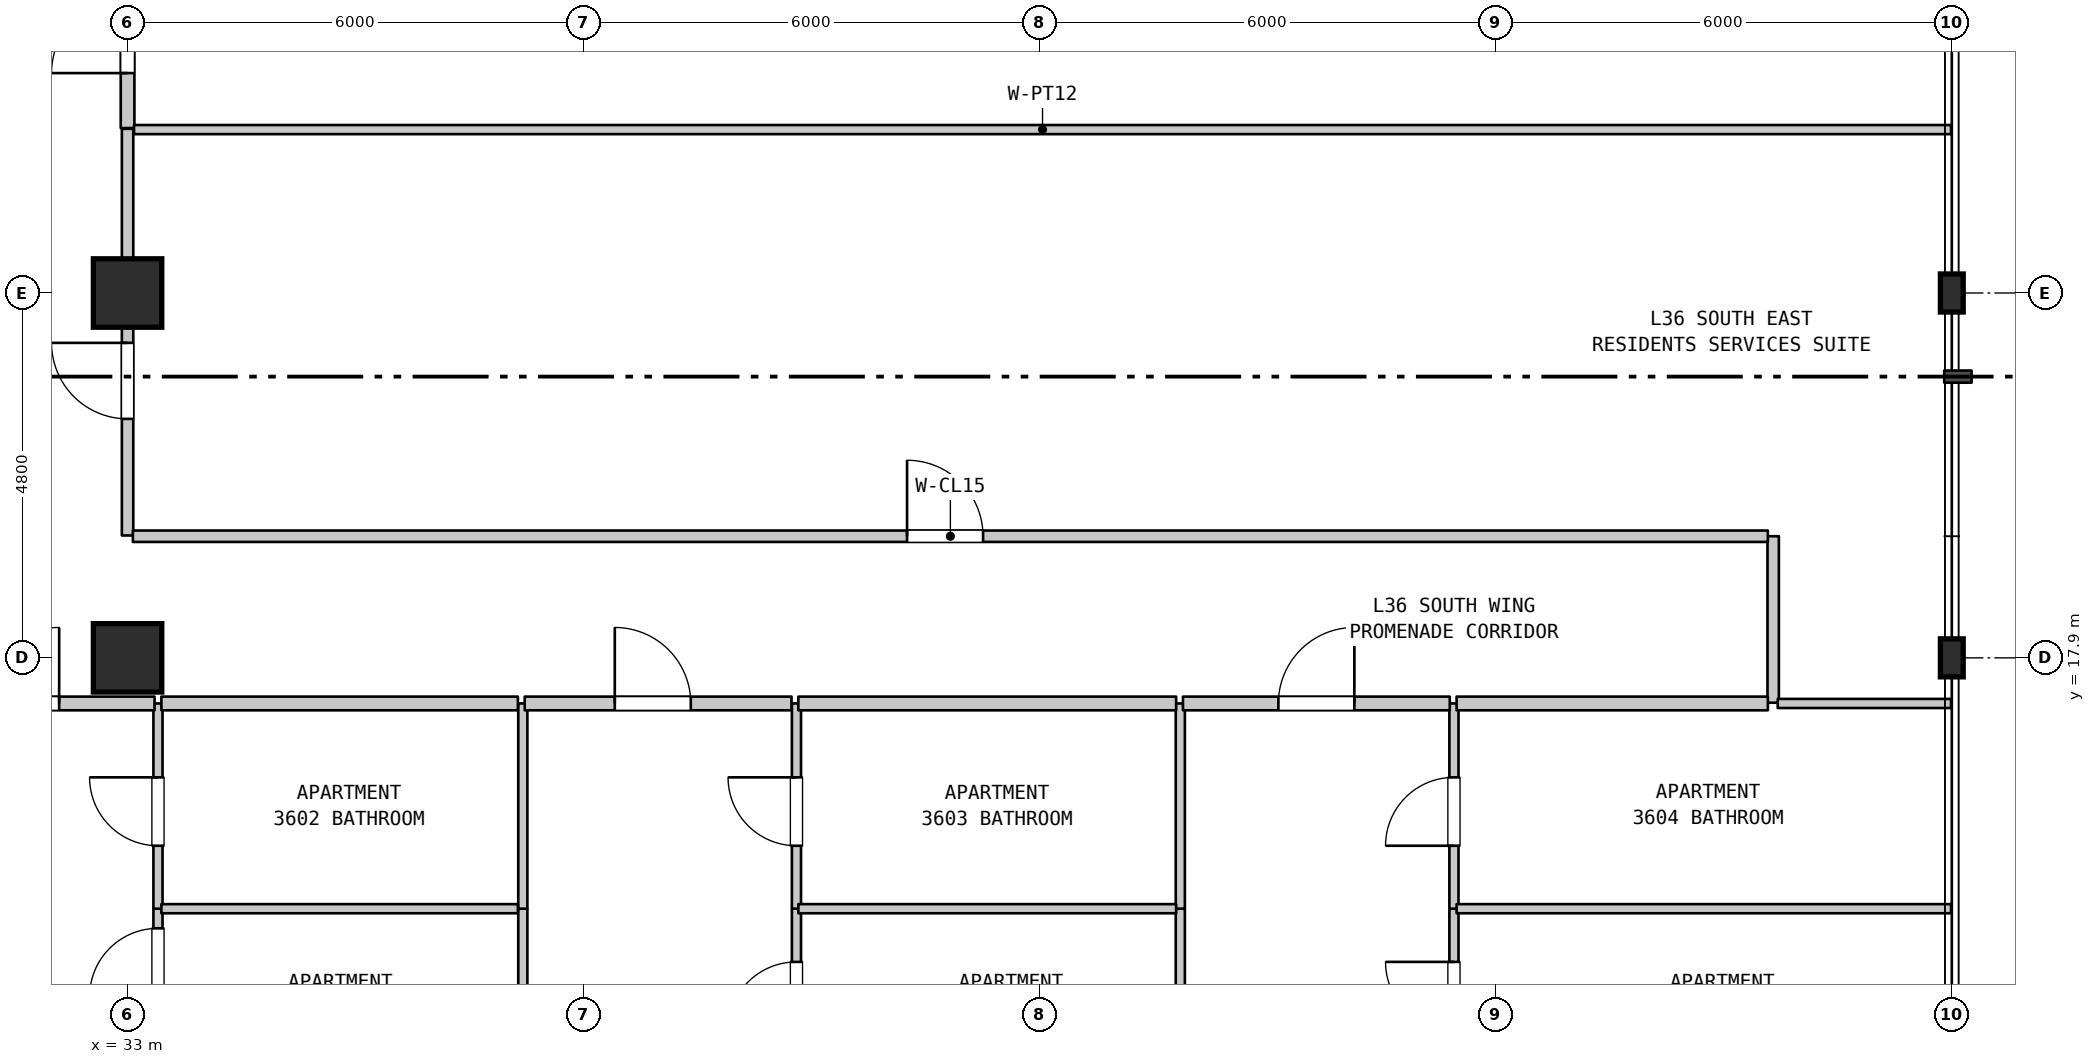
"""IFC4 building model, lengths in metres.
Left out: names, types, materials, properties, quantities, classifications, styles, units other than length and angle.
Written with IfcOpenShell. Run it as: python <this file> out.ifc"""

import sys

from ifc_helpers import new_model, si_unit, direction, frame, frame_2d, origin, origin_2d, place, context, subcontext, project, spatial, rectangle, i_section, extrude, element, fill, save


model = new_model("IFC4")
c1 = context("Model", 3, precision=1e-05, world=origin(), true_north=direction((0.0, 1.0)))
c2 = subcontext(c1, "Body", "Model", "MODEL_VIEW")
j1 = project(units=[si_unit("LENGTHUNIT", "METRE"), si_unit("PLANEANGLEUNIT", "RADIAN")], contexts=[c1])
p1 = place(None, origin())
s1 = spatial("IfcSite", under=j1, at=p1, CompositionType="ELEMENT")
p2 = place(p1, origin())
s2 = spatial("IfcBuilding", under=s1, at=p2, CompositionType="ELEMENT")
p3 = place(p2, frame((0.0, 0.0, 148.3)))
s3 = spatial("IfcBuildingStorey", under=s2, at=p3, CompositionType="ELEMENT", Elevation=148.3)
for number, where, z_axis, x_axis in (
    (1, (33.0, 17.9, 0.0), (0.0, 0.0, 1.0), (1.0, 0.0, 0.0)),
    (2, (33.0, 22.7, 0.0), (0.0, 0.0, 1.0), (1.0, 0.0, 0.0)),
):
    element("IfcColumn", number, at=place(p3, frame(where, z_axis=z_axis, x_axis=x_axis)), inside=s3, PredefinedType="COLUMN", context=c2, shape_type="SweptSolid", body=[
        extrude(rectangle(XDim=0.9, YDim=0.9, at=origin_2d()), origin(), (0.0, 0.0, 1.0), 3.7),
    ])
for number, where, z_axis, x_axis in (
    (3, (57.0, 17.9, 0.0), (0.0, 0.0, 1.0), (1.0, 0.0, 0.0)),
    (4, (57.0, 22.7, 0.0), (0.0, 0.0, 1.0), (1.0, 0.0, 0.0)),
):
    element("IfcColumn", number, at=place(p3, frame(where, z_axis=z_axis, x_axis=x_axis)), inside=s3, PredefinedType="COLUMN", context=c2, shape_type="SweptSolid", body=[
        extrude(i_section(OverallWidth=0.3, OverallDepth=0.5, WebThickness=0.014, FlangeThickness=0.028, FilletRadius=0.027, at=origin_2d()), origin(), (0.0, 0.0, 1.0), 3.7),
    ])
p4 = place(p3, frame((33.0, 19.51, 0.0), z_axis=(0.0, 0.0, 1.0), x_axis=(0.0, 1.0, 0.0)))
e5 = element("IfcWall", 5, at=p4, inside=s3, PredefinedType="STANDARD", context=c2, shape_type="SweptSolid", body=[
    extrude(rectangle(XDim=5.35, YDim=0.15, at=frame_2d((2.675, 0.0))), origin(), (0.0, 0.0, 1.0), 2.935),
])
p5 = place(p4, frame((1.534, 0.0, 0.0)))
e6 = element("IfcOpeningElement", 6, at=p5, cuts=e5, PredefinedType="OPENING", context=c2, shape_type="SweptSolid", body=[
    extrude(rectangle(XDim=1.0, YDim=2.15, at=frame_2d((0.5, 1.075))), frame((0.0, 0.085, 0.0), z_axis=(0.0, -1.0, 0.0), x_axis=(1.0, 0.0, 0.0)), (0.0, 0.0, 1.0), 0.17),
])
p6 = place(p3, frame((33.0, 24.87, 0.0), z_axis=(0.0, 0.0, 1.0), x_axis=(0.0, 1.0, 0.0)))
e7 = element("IfcWall", 7, at=p6, inside=s3, PredefinedType="STANDARD", context=c2, shape_type="SweptSolid", body=[
    extrude(rectangle(XDim=2.6, YDim=0.18, at=frame_2d((1.3, 0.0))), origin(), (0.0, 0.0, 1.0), 2.935),
])
p7 = place(p6, frame((0.723, 0.0, 0.0)))
e8 = element("IfcOpeningElement", 8, at=p7, cuts=e7, PredefinedType="OPENING", context=c2, shape_type="SweptSolid", body=[
    extrude(rectangle(XDim=1.0, YDim=2.15, at=frame_2d((0.5, 1.075))), frame((0.0, 0.1, 0.0), z_axis=(0.0, -1.0, 0.0), x_axis=(1.0, 0.0, 0.0)), (0.0, 0.0, 1.0), 0.2),
])
p8 = place(p3, frame((33.4, 12.3, 0.0), z_axis=(0.0, 0.0, 1.0), x_axis=(0.0, 1.0, 0.0)))
e9 = element("IfcWall", 9, at=p8, inside=s3, PredefinedType="PARTITIONING", context=c2, shape_type="SweptSolid", body=[
    extrude(rectangle(XDim=2.3, YDim=0.12, at=frame_2d((1.15, 0.0))), origin(), (0.0, 0.0, 1.0), 3.385),
])
p9 = place(p8, frame((1.142, 0.0, 0.0)))
e10 = element("IfcOpeningElement", 10, at=p9, cuts=e9, PredefinedType="OPENING", context=c2, shape_type="SweptSolid", body=[
    extrude(rectangle(XDim=0.9, YDim=2.15, at=frame_2d((0.45, 1.075))), frame((0.0, 0.07, 0.0), z_axis=(0.0, -1.0, 0.0), x_axis=(1.0, 0.0, 0.0)), (0.0, 0.0, 1.0), 0.14),
])
p10 = place(p3, frame((33.4, 14.6, 0.0), z_axis=(0.0, 0.0, 1.0), x_axis=(0.0, 1.0, 0.0)))
e11 = element("IfcWall", 11, at=p10, inside=s3, PredefinedType="PARTITIONING", context=c2, shape_type="SweptSolid", body=[
    extrude(rectangle(XDim=2.7, YDim=0.12, at=frame_2d((1.35, 0.0))), origin(), (0.0, 0.0, 1.0), 3.385),
])
p11 = place(p10, frame((0.828, 0.0, 0.0)))
e12 = element("IfcOpeningElement", 12, at=p11, cuts=e11, PredefinedType="OPENING", context=c2, shape_type="SweptSolid", body=[
    extrude(rectangle(XDim=0.9, YDim=2.1, at=frame_2d((0.45, 1.05))), frame((0.0, 0.07, 0.0), z_axis=(0.0, -1.0, 0.0), x_axis=(1.0, 0.0, 0.0)), (0.0, 0.0, 1.0), 0.14),
])
p12 = place(p3, frame((38.2, 12.3, 0.0), z_axis=(0.0, 0.0, 1.0), x_axis=(0.0, 1.0, 0.0)))
e13 = element("IfcWall", 13, at=p12, inside=s3, PredefinedType="PARTITIONING", context=c2, shape_type="SweptSolid", body=[
    extrude(rectangle(XDim=2.3, YDim=0.12, at=frame_2d((1.15, 0.0))), origin(), (0.0, 0.0, 1.0), 3.385),
])
p13 = place(p3, frame((38.2, 14.6, 0.0), z_axis=(0.0, 0.0, 1.0), x_axis=(0.0, 1.0, 0.0)))
e14 = element("IfcWall", 14, at=p13, inside=s3, PredefinedType="PARTITIONING", context=c2, shape_type="SweptSolid", body=[
    extrude(rectangle(XDim=2.7, YDim=0.12, at=frame_2d((1.35, 0.0))), origin(), (0.0, 0.0, 1.0), 3.385),
])
p14 = place(p3, frame((41.8, 12.3, 0.0), z_axis=(0.0, 0.0, 1.0), x_axis=(0.0, 1.0, 0.0)))
e15 = element("IfcWall", 15, at=p14, inside=s3, PredefinedType="PARTITIONING", context=c2, shape_type="SweptSolid", body=[
    extrude(rectangle(XDim=2.3, YDim=0.12, at=frame_2d((1.15, 0.0))), origin(), (0.0, 0.0, 1.0), 3.385),
])
p15 = place(p14, frame((0.7, 0.0, 0.0)))
e16 = element("IfcOpeningElement", 16, at=p15, cuts=e15, PredefinedType="OPENING", context=c2, shape_type="SweptSolid", body=[
    extrude(rectangle(XDim=0.9, YDim=2.15, at=frame_2d((0.45, 1.075))), frame((0.0, 0.07, 0.0), z_axis=(0.0, -1.0, 0.0), x_axis=(1.0, 0.0, 0.0)), (0.0, 0.0, 1.0), 0.14),
])
p16 = place(p3, frame((41.8, 14.6, 0.0), z_axis=(0.0, 0.0, 1.0), x_axis=(0.0, 1.0, 0.0)))
e17 = element("IfcWall", 17, at=p16, inside=s3, PredefinedType="PARTITIONING", context=c2, shape_type="SweptSolid", body=[
    extrude(rectangle(XDim=2.7, YDim=0.12, at=frame_2d((1.35, 0.0))), origin(), (0.0, 0.0, 1.0), 3.385),
])
p17 = place(p16, frame((0.828, 0.0, 0.0)))
e18 = element("IfcOpeningElement", 18, at=p17, cuts=e17, PredefinedType="OPENING", context=c2, shape_type="SweptSolid", body=[
    extrude(rectangle(XDim=0.9, YDim=2.1, at=frame_2d((0.45, 1.05))), frame((0.0, 0.07, 0.0), z_axis=(0.0, -1.0, 0.0), x_axis=(1.0, 0.0, 0.0)), (0.0, 0.0, 1.0), 0.14),
])
p18 = place(p3, frame((46.85, 12.3, 0.0), z_axis=(0.0, 0.0, 1.0), x_axis=(0.0, 1.0, 0.0)))
e19 = element("IfcWall", 19, at=p18, inside=s3, PredefinedType="PARTITIONING", context=c2, shape_type="SweptSolid", body=[
    extrude(rectangle(XDim=2.3, YDim=0.12, at=frame_2d((1.15, 0.0))), origin(), (0.0, 0.0, 1.0), 3.385),
])
p19 = place(p3, frame((46.85, 14.6, 0.0), z_axis=(0.0, 0.0, 1.0), x_axis=(0.0, 1.0, 0.0)))
e20 = element("IfcWall", 20, at=p19, inside=s3, PredefinedType="PARTITIONING", context=c2, shape_type="SweptSolid", body=[
    extrude(rectangle(XDim=2.7, YDim=0.12, at=frame_2d((1.35, 0.0))), origin(), (0.0, 0.0, 1.0), 3.385),
])
p20 = place(p3, frame((50.45, 12.3, 0.0), z_axis=(0.0, 0.0, 1.0), x_axis=(0.0, 1.0, 0.0)))
e21 = element("IfcWall", 21, at=p20, inside=s3, PredefinedType="PARTITIONING", context=c2, shape_type="SweptSolid", body=[
    extrude(rectangle(XDim=2.3, YDim=0.12, at=frame_2d((1.15, 0.0))), origin(), (0.0, 0.0, 1.0), 3.385),
])
p21 = place(p20, frame((0.7, 0.0, 0.0)))
e22 = element("IfcOpeningElement", 22, at=p21, cuts=e21, PredefinedType="OPENING", context=c2, shape_type="SweptSolid", body=[
    extrude(rectangle(XDim=0.9, YDim=2.15, at=frame_2d((0.45, 1.075))), frame((0.0, 0.07, 0.0), z_axis=(0.0, -1.0, 0.0), x_axis=(1.0, 0.0, 0.0)), (0.0, 0.0, 1.0), 0.14),
])
p22 = place(p3, frame((50.45, 14.6, 0.0), z_axis=(0.0, 0.0, 1.0), x_axis=(0.0, 1.0, 0.0)))
e23 = element("IfcWall", 23, at=p22, inside=s3, PredefinedType="PARTITIONING", context=c2, shape_type="SweptSolid", body=[
    extrude(rectangle(XDim=2.7, YDim=0.12, at=frame_2d((1.35, 0.0))), origin(), (0.0, 0.0, 1.0), 3.385),
])
p23 = place(p22, frame((0.828, 0.0, 0.0)))
e24 = element("IfcOpeningElement", 24, at=p23, cuts=e23, PredefinedType="OPENING", context=c2, shape_type="SweptSolid", body=[
    extrude(rectangle(XDim=0.9, YDim=2.1, at=frame_2d((0.45, 1.05))), frame((0.0, 0.07, 0.0), z_axis=(0.0, -1.0, 0.0), x_axis=(1.0, 0.0, 0.0)), (0.0, 0.0, 1.0), 0.14),
])
p24 = place(p3, frame((54.65, 17.31, 0.0), z_axis=(0.0, 0.0, 1.0), x_axis=(0.0, 1.0, 0.0)))
e25 = element("IfcWall", 25, at=p24, inside=s3, PredefinedType="STANDARD", context=c2, shape_type="SweptSolid", body=[
    extrude(rectangle(XDim=2.19, YDim=0.15, at=frame_2d((1.095, 0.0))), origin(), (0.0, 0.0, 1.0), 3.385),
])
p25 = place(p3, frame((33.445, 14.6, 0.0), z_axis=(0.0, 0.0, 1.0), x_axis=(1.0, 0.0, 0.0)))
e26 = element("IfcWall", 26, at=p25, inside=s3, PredefinedType="PARTITIONING", context=c2, shape_type="SweptSolid", body=[
    extrude(rectangle(XDim=4.69, YDim=0.12, at=frame_2d((2.345, 0.0))), origin(), (0.0, 0.0, 1.0), 3.385),
])
p26 = place(p3, frame((41.825, 14.6, 0.0), z_axis=(0.0, 0.0, 1.0), x_axis=(1.0, 0.0, 0.0)))
e27 = element("IfcWall", 27, at=p26, inside=s3, PredefinedType="PARTITIONING", context=c2, shape_type="SweptSolid", body=[
    extrude(rectangle(XDim=4.97, YDim=0.12, at=frame_2d((2.485, 0.0))), origin(), (0.0, 0.0, 1.0), 3.385),
])
p27 = place(p3, frame((50.485, 14.6, 0.0), z_axis=(0.0, 0.0, 1.0), x_axis=(1.0, 0.0, 0.0)))
e28 = element("IfcWall", 28, at=p27, inside=s3, PredefinedType="PARTITIONING", context=c2, shape_type="SweptSolid", body=[
    extrude(rectangle(XDim=6.505, YDim=0.12, at=frame_2d((3.252, 0.0))), origin(), (0.0, 0.0, 1.0), 3.385),
])
p28 = place(p3, frame((29.845, 17.3, 0.0), z_axis=(0.0, 0.0, 1.0), x_axis=(1.0, 0.0, 0.0)))
e29 = element("IfcWall", 29, at=p28, inside=s3, PredefinedType="STANDARD", context=c2, shape_type="SweptSolid", body=[
    extrude(rectangle(XDim=3.51, YDim=0.18, at=frame_2d((1.755, 0.0))), origin(), (0.0, 0.0, 1.0), 3.385),
])
p29 = place(p28, frame((1.255, 0.0, 0.0)))
e30 = element("IfcOpeningElement", 30, at=p29, cuts=e29, PredefinedType="OPENING", context=c2, shape_type="SweptSolid", body=[
    extrude(rectangle(XDim=1.0, YDim=2.15, at=frame_2d((0.5, 1.075))), frame((0.0, 0.1, 0.0), z_axis=(0.0, -1.0, 0.0), x_axis=(1.0, 0.0, 0.0)), (0.0, 0.0, 1.0), 0.2),
])
p30 = place(p3, frame((33.445, 17.3, 0.0), z_axis=(0.0, 0.0, 1.0), x_axis=(1.0, 0.0, 0.0)))
e31 = element("IfcWall", 31, at=p30, inside=s3, PredefinedType="STANDARD", context=c2, shape_type="SweptSolid", body=[
    extrude(rectangle(XDim=4.69, YDim=0.18, at=frame_2d((2.345, 0.0))), origin(), (0.0, 0.0, 1.0), 3.385),
])
p31 = place(p3, frame((38.225, 17.3, 0.0), z_axis=(0.0, 0.0, 1.0), x_axis=(1.0, 0.0, 0.0)))
e32 = element("IfcWall", 32, at=p31, inside=s3, PredefinedType="STANDARD", context=c2, shape_type="SweptSolid", body=[
    extrude(rectangle(XDim=3.51, YDim=0.18, at=frame_2d((1.755, 0.0))), origin(), (0.0, 0.0, 1.0), 3.385),
])
p32 = place(p31, frame((1.185, 0.0, 0.0)))
e33 = element("IfcOpeningElement", 33, at=p32, cuts=e32, PredefinedType="OPENING", context=c2, shape_type="SweptSolid", body=[
    extrude(rectangle(XDim=1.0, YDim=2.15, at=frame_2d((0.5, 1.075))), frame((0.0, 0.1, 0.0), z_axis=(0.0, -1.0, 0.0), x_axis=(1.0, 0.0, 0.0)), (0.0, 0.0, 1.0), 0.2),
])
p33 = place(p3, frame((41.825, 17.3, 0.0), z_axis=(0.0, 0.0, 1.0), x_axis=(1.0, 0.0, 0.0)))
e34 = element("IfcWall", 34, at=p33, inside=s3, PredefinedType="STANDARD", context=c2, shape_type="SweptSolid", body=[
    extrude(rectangle(XDim=4.97, YDim=0.18, at=frame_2d((2.485, 0.0))), origin(), (0.0, 0.0, 1.0), 3.385),
])
p34 = place(p3, frame((46.885, 17.3, 0.0), z_axis=(0.0, 0.0, 1.0), x_axis=(1.0, 0.0, 0.0)))
e35 = element("IfcWall", 35, at=p34, inside=s3, PredefinedType="STANDARD", context=c2, shape_type="SweptSolid", body=[
    extrude(rectangle(XDim=3.51, YDim=0.18, at=frame_2d((1.755, 0.0))), origin(), (0.0, 0.0, 1.0), 3.385),
])
p35 = place(p34, frame((1.255, 0.0, 0.0)))
e36 = element("IfcOpeningElement", 36, at=p35, cuts=e35, PredefinedType="OPENING", context=c2, shape_type="SweptSolid", body=[
    extrude(rectangle(XDim=1.0, YDim=2.15, at=frame_2d((0.5, 1.075))), frame((0.0, 0.1, 0.0), z_axis=(0.0, -1.0, 0.0), x_axis=(1.0, 0.0, 0.0)), (0.0, 0.0, 1.0), 0.2),
])
p36 = place(p3, frame((50.485, 17.3, 0.0), z_axis=(0.0, 0.0, 1.0), x_axis=(1.0, 0.0, 0.0)))
e37 = element("IfcWall", 37, at=p36, inside=s3, PredefinedType="STANDARD", context=c2, shape_type="SweptSolid", body=[
    extrude(rectangle(XDim=4.095, YDim=0.18, at=frame_2d((2.047, 0.0))), origin(), (0.0, 0.0, 1.0), 3.385),
])
p37 = place(p3, frame((54.71, 17.3, 0.0), z_axis=(0.0, 0.0, 1.0), x_axis=(1.0, 0.0, 0.0)))
e38 = element("IfcWall", 38, at=p37, inside=s3, PredefinedType="PARTITIONING", context=c2, shape_type="SweptSolid", body=[
    extrude(rectangle(XDim=2.28, YDim=0.12, at=frame_2d((1.14, 0.0))), origin(), (0.0, 0.0, 1.0), 3.385),
])
p38 = place(p3, frame((33.07, 19.5, 0.0), z_axis=(0.0, 0.0, 1.0), x_axis=(1.0, 0.0, 0.0)))
e39 = element("IfcWall", 39, at=p38, inside=s3, PredefinedType="STANDARD", context=c2, shape_type="SweptSolid", body=[
    extrude(rectangle(XDim=21.51, YDim=0.15, at=frame_2d((10.755, 0.0))), origin(), (0.0, 0.0, 1.0), 3.385),
])
p39 = place(p38, frame((10.185, 0.0, 0.0)))
e40 = element("IfcOpeningElement", 40, at=p39, cuts=e39, PredefinedType="OPENING", context=c2, shape_type="SweptSolid", body=[
    extrude(rectangle(XDim=1.0, YDim=2.15, at=frame_2d((0.5, 1.075))), frame((0.0, 0.085, 0.0), z_axis=(0.0, -1.0, 0.0), x_axis=(1.0, 0.0, 0.0)), (0.0, 0.0, 1.0), 0.17),
])
p40 = place(p3, frame((33.085, 24.85, 0.0), z_axis=(0.0, 0.0, 1.0), x_axis=(1.0, 0.0, 0.0)))
e41 = element("IfcWall", 41, at=p40, inside=s3, PredefinedType="PARTITIONING", context=c2, shape_type="SweptSolid", body=[
    extrude(rectangle(XDim=23.905, YDim=0.12, at=frame_2d((11.953, 0.0))), origin(), (0.0, 0.0, 1.0), 3.385),
])
p41 = place(p5, origin())
e42 = element("IfcDoor", 42, at=p41, inside=s3, OperationType="SINGLE_SWING_RIGHT", PredefinedType="DOOR", context=c2, shape_type="SweptSolid", body=[
    extrude(rectangle(XDim=1.0, YDim=2.15, at=frame_2d((0.5, 1.075))), frame((0.0, 0.025, 0.0), z_axis=(0.0, -1.0, 0.0), x_axis=(1.0, 0.0, 0.0)), (0.0, 0.0, 1.0), 0.05),
])
fill(e6, e42)
p42 = place(p7, origin())
e43 = element("IfcDoor", 43, at=p42, inside=s3, OperationType="SINGLE_SWING_LEFT", PredefinedType="DOOR", context=c2, shape_type="SweptSolid", body=[
    extrude(rectangle(XDim=1.0, YDim=2.15, at=frame_2d((0.5, 1.075))), frame((0.0, 0.025, 0.0), z_axis=(0.0, -1.0, 0.0), x_axis=(1.0, 0.0, 0.0)), (0.0, 0.0, 1.0), 0.05),
])
fill(e8, e43)
p43 = place(p9, origin())
e44 = element("IfcDoor", 44, at=p43, inside=s3, OperationType="SINGLE_SWING_LEFT", PredefinedType="DOOR", context=c2, shape_type="SweptSolid", body=[
    extrude(rectangle(XDim=0.9, YDim=2.15, at=frame_2d((0.45, 1.075))), frame((0.0, 0.025, 0.0), z_axis=(0.0, -1.0, 0.0), x_axis=(1.0, 0.0, 0.0)), (0.0, 0.0, 1.0), 0.05),
])
fill(e10, e44)
p44 = place(p11, origin())
e45 = element("IfcDoor", 45, at=p44, inside=s3, OperationType="SINGLE_SWING_RIGHT", PredefinedType="DOOR", context=c2, shape_type="SweptSolid", body=[
    extrude(rectangle(XDim=0.9, YDim=2.1, at=frame_2d((0.45, 1.05))), frame((0.0, 0.025, 0.0), z_axis=(0.0, -1.0, 0.0), x_axis=(1.0, 0.0, 0.0)), (0.0, 0.0, 1.0), 0.05),
])
fill(e12, e45)
p45 = place(p15, origin())
e46 = element("IfcDoor", 46, at=p45, inside=s3, OperationType="SINGLE_SWING_LEFT", PredefinedType="DOOR", context=c2, shape_type="SweptSolid", body=[
    extrude(rectangle(XDim=0.9, YDim=2.15, at=frame_2d((0.45, 1.075))), frame((0.0, 0.025, 0.0), z_axis=(0.0, -1.0, 0.0), x_axis=(1.0, 0.0, 0.0)), (0.0, 0.0, 1.0), 0.05),
])
fill(e16, e46)
p46 = place(p17, origin())
e47 = element("IfcDoor", 47, at=p46, inside=s3, OperationType="SINGLE_SWING_RIGHT", PredefinedType="DOOR", context=c2, shape_type="SweptSolid", body=[
    extrude(rectangle(XDim=0.9, YDim=2.1, at=frame_2d((0.45, 1.05))), frame((0.0, 0.025, 0.0), z_axis=(0.0, -1.0, 0.0), x_axis=(1.0, 0.0, 0.0)), (0.0, 0.0, 1.0), 0.05),
])
fill(e18, e47)
p47 = place(p21, origin())
e48 = element("IfcDoor", 48, at=p47, inside=s3, OperationType="SINGLE_SWING_RIGHT", PredefinedType="DOOR", context=c2, shape_type="SweptSolid", body=[
    extrude(rectangle(XDim=0.9, YDim=2.15, at=frame_2d((0.45, 1.075))), frame((0.0, 0.025, 0.0), z_axis=(0.0, -1.0, 0.0), x_axis=(1.0, 0.0, 0.0)), (0.0, 0.0, 1.0), 0.05),
])
fill(e22, e48)
p48 = place(p23, origin())
e49 = element("IfcDoor", 49, at=p48, inside=s3, OperationType="SINGLE_SWING_LEFT", PredefinedType="DOOR", context=c2, shape_type="SweptSolid", body=[
    extrude(rectangle(XDim=0.9, YDim=2.1, at=frame_2d((0.45, 1.05))), frame((0.0, 0.025, 0.0), z_axis=(0.0, -1.0, 0.0), x_axis=(1.0, 0.0, 0.0)), (0.0, 0.0, 1.0), 0.05),
])
fill(e24, e49)
p49 = place(p29, origin())
e50 = element("IfcDoor", 50, at=p49, inside=s3, OperationType="SINGLE_SWING_RIGHT", PredefinedType="DOOR", context=c2, shape_type="SweptSolid", body=[
    extrude(rectangle(XDim=1.0, YDim=2.15, at=frame_2d((0.5, 1.075))), frame((0.0, 0.025, 0.0), z_axis=(0.0, -1.0, 0.0), x_axis=(1.0, 0.0, 0.0)), (0.0, 0.0, 1.0), 0.05),
])
fill(e30, e50)
p50 = place(p32, origin())
e51 = element("IfcDoor", 51, at=p50, inside=s3, OperationType="SINGLE_SWING_LEFT", PredefinedType="DOOR", context=c2, shape_type="SweptSolid", body=[
    extrude(rectangle(XDim=1.0, YDim=2.15, at=frame_2d((0.5, 1.075))), frame((0.0, 0.025, 0.0), z_axis=(0.0, -1.0, 0.0), x_axis=(1.0, 0.0, 0.0)), (0.0, 0.0, 1.0), 0.05),
])
fill(e33, e51)
p51 = place(p35, origin())
e52 = element("IfcDoor", 52, at=p51, inside=s3, OperationType="SINGLE_SWING_RIGHT", PredefinedType="DOOR", context=c2, shape_type="SweptSolid", body=[
    extrude(rectangle(XDim=1.0, YDim=2.15, at=frame_2d((0.5, 1.075))), frame((0.0, 0.025, 0.0), z_axis=(0.0, -1.0, 0.0), x_axis=(1.0, 0.0, 0.0)), (0.0, 0.0, 1.0), 0.05),
])
fill(e36, e52)
p52 = place(p39, origin())
e53 = element("IfcDoor", 53, at=p52, inside=s3, OperationType="SINGLE_SWING_LEFT", PredefinedType="DOOR", context=c2, shape_type="SweptSolid", body=[
    extrude(rectangle(XDim=1.0, YDim=2.15, at=frame_2d((0.5, 1.075))), frame((0.0, 0.025, 0.0), z_axis=(0.0, -1.0, 0.0), x_axis=(1.0, 0.0, 0.0)), (0.0, 0.0, 1.0), 0.05),
])
fill(e40, e53)
save(model, sys.argv[1])
